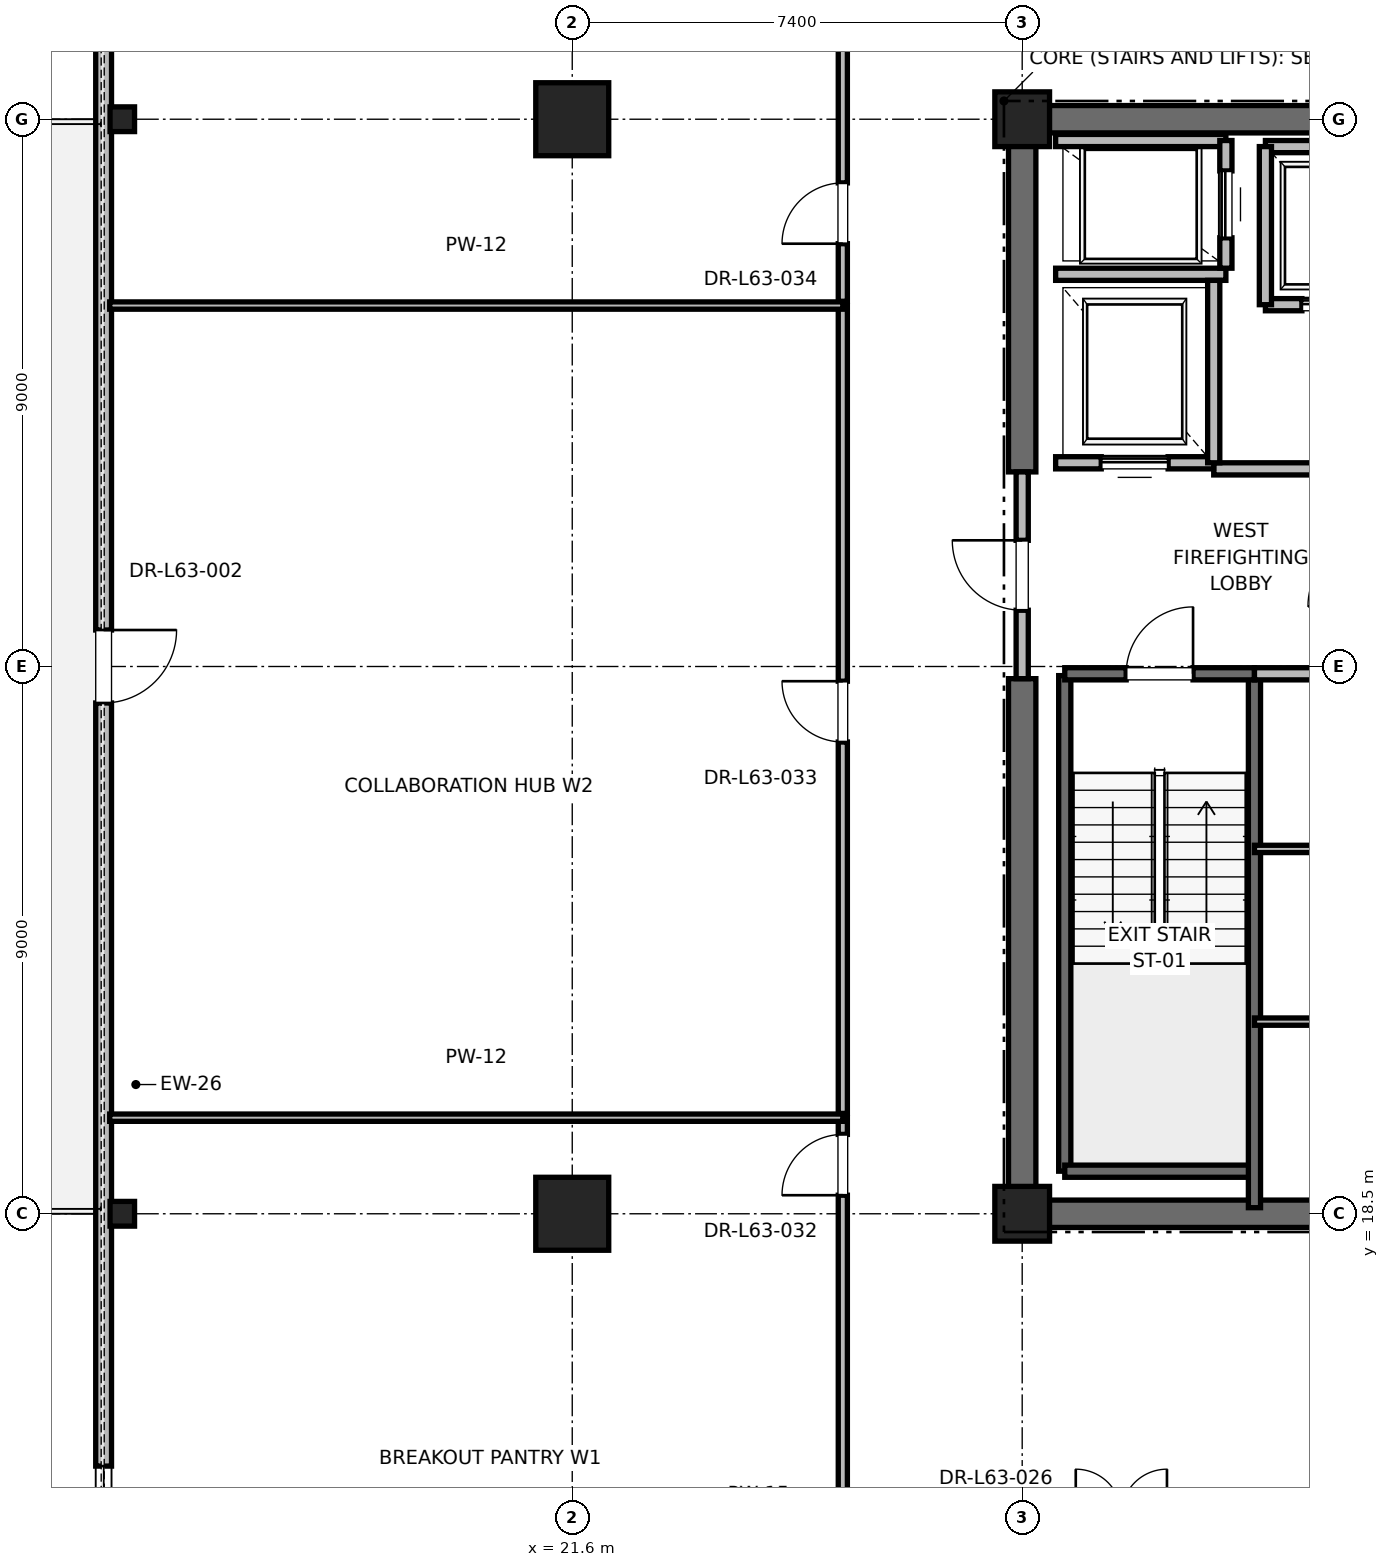
"""IFC4 building model, lengths in metres.
Left out: names, types, materials, properties, quantities, classifications, styles, units other than length and angle.
Written with IfcOpenShell. Run it as: python <this file> out.ifc"""

import sys

from ifc_helpers import new_model, si_unit, direction, frame, frame_2d, origin, origin_2d, place, context, subcontext, project, spatial, rectangle, i_section, extrude, element, fill, save


model = new_model("IFC4")
c1 = context("Model", 3, precision=1e-05, world=origin(), true_north=direction((0.0, 1.0)))
c2 = subcontext(c1, "Body", "Model", "MODEL_VIEW")
j1 = project(units=[si_unit("LENGTHUNIT", "METRE"), si_unit("PLANEANGLEUNIT", "RADIAN")], contexts=[c1])
p1 = place(None, origin())
s1 = spatial("IfcSite", under=j1, at=p1, CompositionType="ELEMENT")
p2 = place(p1, origin())
s2 = spatial("IfcBuilding", under=s1, at=p2, CompositionType="ELEMENT")
p3 = place(p2, frame((0.0, 0.0, 271.2)))
s3 = spatial("IfcBuildingStorey", under=s2, at=p3, CompositionType="ELEMENT", Elevation=271.2)
for number, where, z_axis, x_axis in (
    (1, (21.6, 18.5, 0.0), (0.0, 0.0, 1.0), (1.0, 0.0, 0.0)),
    (2, (21.6, 36.5, 0.0), (0.0, 0.0, 1.0), (1.0, 0.0, 0.0)),
):
    element("IfcColumn", number, at=place(p3, frame(where, z_axis=z_axis, x_axis=x_axis)), inside=s3, PredefinedType="COLUMN", context=c2, shape_type="SweptSolid", body=[
        extrude(rectangle(XDim=1.2, YDim=1.2, at=origin_2d()), origin(), (0.0, 0.0, 1.0), 4.0),
    ])
for number, where, z_axis, x_axis in (
    (3, (14.2, 18.5, 0.0), (0.0, 0.0, 1.0), (1.0, 0.0, 0.0)),
    (4, (14.2, 36.5, 0.0), (0.0, 0.0, 1.0), (1.0, 0.0, 0.0)),
):
    element("IfcColumn", number, at=place(p3, frame(where, z_axis=z_axis, x_axis=x_axis)), inside=s3, PredefinedType="COLUMN", context=c2, shape_type="SweptSolid", body=[
        extrude(i_section(OverallWidth=0.403, OverallDepth=0.406, WebThickness=0.027, FlangeThickness=0.043, FilletRadius=0.015, at=origin_2d()), origin(), (0.0, 0.0, 1.0), 4.0),
    ])
for number, where, z_axis, x_axis in (
    (5, (29.0, 18.5, 0.0), (0.0, 0.0, 1.0), (1.0, 0.0, 0.0)),
    (6, (29.0, 36.5, 0.0), (0.0, 0.0, 1.0), (1.0, 0.0, 0.0)),
):
    element("IfcColumn", number, at=place(p3, frame(where, z_axis=z_axis, x_axis=x_axis)), inside=s3, PredefinedType="PILASTER", context=c2, shape_type="SweptSolid", body=[
        extrude(rectangle(XDim=0.9, YDim=0.9, at=origin_2d()), origin(), (0.0, 0.0, 1.0), 4.0),
    ])
p4 = place(p3, frame((29.0, 18.5, 0.0), z_axis=(0.0, 0.0, 1.0), x_axis=(1.0, 0.0, 0.0)))
e7 = element("IfcWall", 7, at=p4, inside=s3, PredefinedType="SHEAR", context=c2, shape_type="SweptSolid", body=[
    extrude(rectangle(XDim=9.2, YDim=0.45, at=frame_2d((4.6, 0.0))), origin(), (0.0, 0.0, 1.0), 3.785),
])
p5 = place(p3, frame((29.0, 36.5, 0.0), z_axis=(0.0, 0.0, 1.0), x_axis=(1.0, 0.0, 0.0)))
e8 = element("IfcWall", 8, at=p5, inside=s3, PredefinedType="SHEAR", context=c2, shape_type="SweptSolid", body=[
    extrude(rectangle(XDim=5.8, YDim=0.45, at=frame_2d((2.9, 0.0))), origin(), (0.0, 0.0, 1.0), 3.785),
])
p6 = place(p3, frame((29.0, 18.5, 0.0), z_axis=(0.0, 0.0, 1.0), x_axis=(0.0, 1.0, 0.0)))
e9 = element("IfcWall", 9, at=p6, inside=s3, PredefinedType="SHEAR", context=c2, shape_type="SweptSolid", body=[
    extrude(rectangle(XDim=8.8, YDim=0.45, at=frame_2d((4.4, 0.0))), origin(), (0.0, 0.0, 1.0), 3.785),
])
p7 = place(p3, frame((29.0, 30.7, 0.0), z_axis=(0.0, 0.0, 1.0), x_axis=(0.0, 1.0, 0.0)))
e10 = element("IfcWall", 10, at=p7, inside=s3, PredefinedType="SHEAR", context=c2, shape_type="SweptSolid", body=[
    extrude(rectangle(XDim=5.8, YDim=0.45, at=frame_2d((2.9, 0.0))), origin(), (0.0, 0.0, 1.0), 3.785),
])
p8 = place(p3, frame((13.893, 46.45, 0.0), z_axis=(0.0, 0.0, 1.0), x_axis=(0.0, -1.0, 0.0)))
e11 = element("IfcWall", 11, at=p8, inside=s3, PredefinedType="PARAPET", context=c2, shape_type="SweptSolid", body=[
    extrude(rectangle(XDim=37.899, YDim=0.26, at=frame_2d((18.95, 0.0))), origin(), (0.0, 0.0, 1.0), 3.123),
])
p9 = place(p8, frame((4.2, 0.0, 0.85)))
e12 = element("IfcOpeningElement", 12, at=p9, cuts=e11, PredefinedType="OPENING", context=c2, shape_type="SweptSolid", body=[
    extrude(rectangle(XDim=1.6, YDim=2.1, at=frame_2d((0.8, 1.05))), frame((0.0, 0.13, 0.0), z_axis=(0.0, -1.0, 0.0), x_axis=(1.0, 0.0, 0.0)), (0.0, 0.0, 1.0), 0.26),
])
p10 = place(p8, frame((18.35, 0.0, 0.0)))
e13 = element("IfcOpeningElement", 13, at=p10, cuts=e11, PredefinedType="OPENING", context=c2, shape_type="SweptSolid", body=[
    extrude(rectangle(XDim=1.2, YDim=2.2, at=frame_2d((0.6, 1.1))), frame((0.0, 0.13, 0.0), z_axis=(0.0, -1.0, 0.0), x_axis=(1.0, 0.0, 0.0)), (0.0, 0.0, 1.0), 0.26),
])
p11 = place(p8, frame((32.099, 0.0, 0.85)))
e14 = element("IfcOpeningElement", 14, at=p11, cuts=e11, PredefinedType="OPENING", context=c2, shape_type="SweptSolid", body=[
    extrude(rectangle(XDim=1.6, YDim=2.1, at=frame_2d((0.8, 1.05))), frame((0.0, 0.13, 0.0), z_axis=(0.0, -1.0, 0.0), x_axis=(1.0, 0.0, 0.0)), (0.0, 0.0, 1.0), 0.26),
])
p12 = place(p3, frame((29.7, 19.2, 0.0), z_axis=(0.0, 0.0, 1.0), x_axis=(0.0, 1.0, 0.0)))
e15 = element("IfcWall", 15, at=p12, inside=s3, PredefinedType="SOLIDWALL", context=c2, shape_type="SweptSolid", body=[
    extrude(rectangle(XDim=8.15, YDim=0.2, at=frame_2d((4.075, 0.0))), origin(), (0.0, 0.0, 1.0), 3.785),
])
p13 = place(p3, frame((29.7, 19.2, 0.0), z_axis=(0.0, 0.0, 1.0), x_axis=(1.0, 0.0, 0.0)))
e16 = element("IfcWall", 16, at=p13, inside=s3, PredefinedType="SOLIDWALL", context=c2, shape_type="SweptSolid", body=[
    extrude(rectangle(XDim=3.12, YDim=0.2, at=frame_2d((1.56, 0.0))), origin(), (0.0, 0.0, 1.0), 3.785),
])
p14 = place(p3, frame((32.82, 18.6, 0.0), z_axis=(0.0, 0.0, 1.0), x_axis=(0.0, 1.0, 0.0)))
e17 = element("IfcWall", 17, at=p14, inside=s3, PredefinedType="SOLIDWALL", context=c2, shape_type="SweptSolid", body=[
    extrude(rectangle(XDim=8.78, YDim=0.2, at=frame_2d((4.39, 0.0))), origin(), (0.0, 0.0, 1.0), 3.785),
])
p15 = place(p3, frame((29.7, 27.38, 0.0), z_axis=(0.0, 0.0, 1.0), x_axis=(1.0, 0.0, 0.0)))
e18 = element("IfcWall", 18, at=p15, inside=s3, PredefinedType="SOLIDWALL", context=c2, shape_type="SweptSolid", body=[
    extrude(rectangle(XDim=3.12, YDim=0.2, at=frame_2d((1.56, 0.0))), origin(), (0.0, 0.0, 1.0), 3.785),
])
p16 = place(p15, frame((1.01, 0.0, 0.0)))
e19 = element("IfcOpeningElement", 19, at=p16, cuts=e18, PredefinedType="OPENING", context=c2, shape_type="SweptSolid", body=[
    extrude(rectangle(XDim=1.1, YDim=2.15, at=frame_2d((0.55, 1.075))), frame((0.0, 0.1, 0.0), z_axis=(0.0, -1.0, 0.0), x_axis=(1.0, 0.0, 0.0)), (0.0, 0.0, 1.0), 0.2),
])
p17 = place(p3, frame((29.0, 27.3, 0.0), z_axis=(0.0, 0.0, 1.0), x_axis=(0.0, 1.0, 0.0)))
e20 = element("IfcWall", 20, at=p17, inside=s3, PredefinedType="PARTITIONING", context=c2, shape_type="SweptSolid", body=[
    extrude(rectangle(XDim=3.4, YDim=0.2, at=frame_2d((1.7, 0.0))), origin(), (0.0, 0.0, 1.0), 2.865),
])
p18 = place(p17, frame((1.125, 0.0, 0.0)))
e21 = element("IfcOpeningElement", 21, at=p18, cuts=e20, PredefinedType="OPENING", context=c2, shape_type="SweptSolid", body=[
    extrude(rectangle(XDim=1.15, YDim=2.2, at=frame_2d((0.575, 1.1))), frame((0.0, 0.1, 0.0), z_axis=(0.0, -1.0, 0.0), x_axis=(1.0, 0.0, 0.0)), (0.0, 0.0, 1.0), 0.2),
])
p19 = place(p3, frame((32.82, 27.38, 0.0), z_axis=(0.0, 0.0, 1.0), x_axis=(1.0, 0.0, 0.0)))
e22 = element("IfcWall", 22, at=p19, inside=s3, PredefinedType="PARTITIONING", context=c2, shape_type="SweptSolid", body=[
    extrude(rectangle(XDim=5.62, YDim=0.2, at=frame_2d((2.81, 0.0))), origin(), (0.0, 0.0, 1.0), 3.785),
])
p20 = place(p3, frame((32.15, 30.75, 0.0), z_axis=(0.0, 0.0, 1.0), x_axis=(1.0, 0.0, 0.0)))
e23 = element("IfcWall", 23, at=p20, inside=s3, PredefinedType="PARTITIONING", context=c2, shape_type="SweptSolid", body=[
    extrude(rectangle(XDim=2.7, YDim=0.2, at=frame_2d((1.35, 0.0))), origin(), (0.0, 0.0, 1.0), 3.785),
])
p21 = place(p3, frame((29.55, 30.85, 0.0), z_axis=(0.0, 0.0, 1.0), x_axis=(1.0, 0.0, 0.0)))
e24 = element("IfcWall", 24, at=p21, inside=s3, PredefinedType="SOLIDWALL", context=c2, shape_type="SweptSolid", body=[
    extrude(rectangle(XDim=2.6, YDim=0.2, at=frame_2d((1.3, 0.0))), origin(), (0.0, 0.0, 1.0), 2.865),
])
p22 = place(p21, frame((0.75, 0.0, 0.0)))
e25 = element("IfcOpeningElement", 25, at=p22, cuts=e24, PredefinedType="OPENING", context=c2, shape_type="SweptSolid", body=[
    extrude(rectangle(XDim=1.1, YDim=2.2, at=frame_2d((0.55, 1.1))), frame((0.0, 0.1, 0.0), z_axis=(0.0, -1.0, 0.0), x_axis=(1.0, 0.0, 0.0)), (0.0, 0.0, 1.0), 0.2),
])
p23 = place(p3, frame((29.55, 33.95, 0.0), z_axis=(0.0, 0.0, 1.0), x_axis=(1.0, 0.0, 0.0)))
e26 = element("IfcWall", 26, at=p23, inside=s3, PredefinedType="SOLIDWALL", context=c2, shape_type="SweptSolid", body=[
    extrude(rectangle(XDim=2.8, YDim=0.2, at=frame_2d((1.4, 0.0))), origin(), (0.0, 0.0, 1.0), 3.785),
])
p24 = place(p3, frame((32.15, 30.85, 0.0), z_axis=(0.0, 0.0, 1.0), x_axis=(0.0, 1.0, 0.0)))
e27 = element("IfcWall", 27, at=p24, inside=s3, PredefinedType="SOLIDWALL", context=c2, shape_type="SweptSolid", body=[
    extrude(rectangle(XDim=3.0, YDim=0.2, at=frame_2d((1.5, 0.0))), origin(), (0.0, 0.0, 1.0), 3.785),
])
p25 = place(p3, frame((32.35, 36.15, 0.0), z_axis=(0.0, 0.0, 1.0), x_axis=(-1.0, 0.0, 0.0)))
e28 = element("IfcWall", 28, at=p25, inside=s3, PredefinedType="SOLIDWALL", context=c2, shape_type="SweptSolid", body=[
    extrude(rectangle(XDim=2.8, YDim=0.2, at=frame_2d((1.4, 0.0))), origin(), (0.0, 0.0, 1.0), 3.148),
])
p26 = place(p3, frame((32.35, 34.05, 0.0), z_axis=(0.0, 0.0, 1.0), x_axis=(0.0, 1.0, 0.0)))
e29 = element("IfcWall", 29, at=p26, inside=s3, PredefinedType="SOLIDWALL", context=c2, shape_type="SweptSolid", body=[
    extrude(rectangle(XDim=2.1, YDim=0.2, at=frame_2d((1.05, 0.0))), origin(), (0.0, 0.0, 1.0), 3.785),
])
p27 = place(p26, frame((0.5, 0.0, 0.0)))
e30 = element("IfcOpeningElement", 30, at=p27, cuts=e29, PredefinedType="OPENING", context=c2, shape_type="SweptSolid", body=[
    extrude(rectangle(XDim=1.1, YDim=2.2, at=frame_2d((0.55, 1.1))), frame((0.0, 0.1, 0.0), z_axis=(0.0, -1.0, 0.0), x_axis=(1.0, 0.0, 0.0)), (0.0, 0.0, 1.0), 0.2),
])
p28 = place(p3, frame((33.0, 33.45, 0.0), z_axis=(0.0, 0.0, 1.0), x_axis=(1.0, 0.0, 0.0)))
e31 = element("IfcWall", 31, at=p28, inside=s3, PredefinedType="SOLIDWALL", context=c2, shape_type="SweptSolid", body=[
    extrude(rectangle(XDim=2.3, YDim=0.2, at=frame_2d((1.15, 0.0))), origin(), (0.0, 0.0, 1.0), 3.785),
])
p29 = place(p28, frame((0.6, 0.0, 0.0)))
e32 = element("IfcOpeningElement", 32, at=p29, cuts=e31, PredefinedType="OPENING", context=c2, shape_type="SweptSolid", body=[
    extrude(rectangle(XDim=1.1, YDim=2.2, at=frame_2d((0.55, 1.1))), frame((0.0, 0.1, 0.0), z_axis=(0.0, -1.0, 0.0), x_axis=(1.0, 0.0, 0.0)), (0.0, 0.0, 1.0), 0.2),
])
p30 = place(p3, frame((35.3, 36.05, 0.0), z_axis=(0.0, 0.0, 1.0), x_axis=(-1.0, 0.0, 0.0)))
e33 = element("IfcWall", 33, at=p30, inside=s3, PredefinedType="SOLIDWALL", context=c2, shape_type="SweptSolid", body=[
    extrude(rectangle(XDim=2.3, YDim=0.2, at=frame_2d((1.15, 0.0))), origin(), (0.0, 0.0, 1.0), 2.865),
])
p31 = place(p3, frame((33.0, 36.05, 0.0), z_axis=(0.0, 0.0, 1.0), x_axis=(0.0, -1.0, 0.0)))
e34 = element("IfcWall", 34, at=p31, inside=s3, PredefinedType="SOLIDWALL", context=c2, shape_type="SweptSolid", body=[
    extrude(rectangle(XDim=2.6, YDim=0.2, at=frame_2d((1.3, 0.0))), origin(), (0.0, 0.0, 1.0), 3.785),
])
for number, where, z_axis, x_axis in (
    (35, (32.82, 21.66, 0.0), (0.0, 0.0, 1.0), (1.0, 0.0, 0.0)),
    (36, (32.82, 24.5, 0.0), (0.0, 0.0, 1.0), (1.0, 0.0, 0.0)),
):
    element("IfcWall", number, at=place(p3, frame(where, z_axis=z_axis, x_axis=x_axis)), inside=s3, PredefinedType="PARTITIONING", context=c2, shape_type="SweptSolid", body=[
        extrude(rectangle(XDim=5.23, YDim=0.12, at=frame_2d((2.615, 0.0))), origin(), (0.0, 0.0, 1.0), 2.85),
    ])
p32 = place(p3, frame((26.05, 8.95, 0.0), z_axis=(0.0, 0.0, 1.0), x_axis=(0.0, 1.0, 0.0)))
e37 = element("IfcWall", 37, at=p32, inside=s3, PredefinedType="PARTITIONING", context=c2, shape_type="SweptSolid", body=[
    extrude(rectangle(XDim=11.13, YDim=0.15, at=frame_2d((5.565, 0.0))), origin(), (0.0, 0.0, 1.0), 2.85),
])
p33 = place(p32, frame((9.855, 0.0, 0.0)))
e38 = element("IfcOpeningElement", 38, at=p33, cuts=e37, PredefinedType="OPENING", context=c2, shape_type="SweptSolid", body=[
    extrude(rectangle(XDim=1.0, YDim=2.15, at=frame_2d((0.5, 1.075))), frame((0.0, 0.075, 0.0), z_axis=(0.0, -1.0, 0.0), x_axis=(1.0, 0.0, 0.0)), (0.0, 0.0, 1.0), 0.15),
])
p34 = place(p3, frame((13.993, 20.08, 0.0), z_axis=(0.0, 0.0, 1.0), x_axis=(1.0, 0.0, 0.0)))
e39 = element("IfcWall", 39, at=p34, inside=s3, PredefinedType="PARTITIONING", context=c2, shape_type="SweptSolid", body=[
    extrude(rectangle(XDim=12.057, YDim=0.12, at=frame_2d((6.029, 0.0))), origin(), (0.0, 0.0, 1.0), 2.85),
])
p35 = place(p3, frame((26.05, 20.15, 0.0), z_axis=(0.0, 0.0, 1.0), x_axis=(0.0, 1.0, 0.0)))
e40 = element("IfcWall", 40, at=p35, inside=s3, PredefinedType="PARTITIONING", context=c2, shape_type="SweptSolid", body=[
    extrude(rectangle(XDim=13.286, YDim=0.15, at=frame_2d((6.643, 0.0))), origin(), (0.0, 0.0, 1.0), 2.85),
])
p36 = place(p35, frame((6.108, 0.0, 0.0)))
e41 = element("IfcOpeningElement", 41, at=p36, cuts=e40, PredefinedType="OPENING", context=c2, shape_type="SweptSolid", body=[
    extrude(rectangle(XDim=1.0, YDim=2.15, at=frame_2d((0.5, 1.075))), frame((0.0, 0.075, 0.0), z_axis=(0.0, -1.0, 0.0), x_axis=(1.0, 0.0, 0.0)), (0.0, 0.0, 1.0), 0.15),
])
p37 = place(p3, frame((13.993, 33.436, 0.0), z_axis=(0.0, 0.0, 1.0), x_axis=(1.0, 0.0, 0.0)))
e42 = element("IfcWall", 42, at=p37, inside=s3, PredefinedType="PARTITIONING", context=c2, shape_type="SweptSolid", body=[
    extrude(rectangle(XDim=12.057, YDim=0.12, at=frame_2d((6.029, 0.0))), origin(), (0.0, 0.0, 1.0), 2.85),
])
p38 = place(p3, frame((26.05, 33.506, 0.0), z_axis=(0.0, 0.0, 1.0), x_axis=(0.0, 1.0, 0.0)))
e43 = element("IfcWall", 43, at=p38, inside=s3, PredefinedType="PARTITIONING", context=c2, shape_type="SweptSolid", body=[
    extrude(rectangle(XDim=12.544, YDim=0.15, at=frame_2d((6.272, 0.0))), origin(), (0.0, 0.0, 1.0), 2.85),
])
p39 = place(p38, frame((0.947, 0.0, 0.0)))
e44 = element("IfcOpeningElement", 44, at=p39, cuts=e43, PredefinedType="OPENING", context=c2, shape_type="SweptSolid", body=[
    extrude(rectangle(XDim=1.0, YDim=2.15, at=frame_2d((0.5, 1.075))), frame((0.0, 0.075, 0.0), z_axis=(0.0, -1.0, 0.0), x_axis=(1.0, 0.0, 0.0)), (0.0, 0.0, 1.0), 0.15),
])
p40 = place(p10, origin())
e45 = element("IfcDoor", 45, at=p40, inside=s3, OperationType="SINGLE_SWING_LEFT", PredefinedType="DOOR", context=c2, shape_type="SweptSolid", body=[
    extrude(rectangle(XDim=1.2, YDim=2.2, at=frame_2d((0.6, 1.1))), frame((0.0, 0.025, 0.0), z_axis=(0.0, -1.0, 0.0), x_axis=(1.0, 0.0, 0.0)), (0.0, 0.0, 1.0), 0.05),
])
fill(e13, e45)
p41 = place(p11, origin())
e46 = element("IfcWindow", 46, at=p41, inside=s3, PartitioningType="SINGLE_PANEL", PredefinedType="WINDOW", context=c2, shape_type="SweptSolid", body=[
    extrude(rectangle(XDim=1.6, YDim=2.1, at=frame_2d((0.8, 1.05))), frame((0.0, 0.03, 0.0), z_axis=(0.0, -1.0, 0.0), x_axis=(1.0, 0.0, 0.0)), (0.0, 0.0, 1.0), 0.06),
])
fill(e14, e46)
p42 = place(p16, origin())
e47 = element("IfcDoor", 47, at=p42, inside=s3, OperationType="SINGLE_SWING_RIGHT", PredefinedType="DOOR", context=c2, shape_type="SweptSolid", body=[
    extrude(rectangle(XDim=1.1, YDim=2.15, at=frame_2d((0.55, 1.075))), frame((0.0, 0.025, 0.0), z_axis=(0.0, -1.0, 0.0), x_axis=(1.0, 0.0, 0.0)), (0.0, 0.0, 1.0), 0.05),
])
fill(e19, e47)
p43 = place(p18, origin())
e48 = element("IfcDoor", 48, at=p43, inside=s3, OperationType="SINGLE_SWING_RIGHT", PredefinedType="DOOR", context=c2, shape_type="SweptSolid", body=[
    extrude(rectangle(XDim=1.15, YDim=2.2, at=frame_2d((0.575, 1.1))), frame((0.0, 0.025, 0.0), z_axis=(0.0, -1.0, 0.0), x_axis=(1.0, 0.0, 0.0)), (0.0, 0.0, 1.0), 0.05),
])
fill(e21, e48)
p44 = place(p22, origin())
e49 = element("IfcDoor", 49, at=p44, inside=s3, OperationType="SLIDING_TO_RIGHT", PredefinedType="DOOR", context=c2, shape_type="SweptSolid", body=[
    extrude(rectangle(XDim=1.1, YDim=2.2, at=frame_2d((0.55, 1.1))), frame((0.0, 0.025, 0.0), z_axis=(0.0, -1.0, 0.0), x_axis=(1.0, 0.0, 0.0)), (0.0, 0.0, 1.0), 0.05),
])
fill(e25, e49)
p45 = place(p27, origin())
e50 = element("IfcDoor", 50, at=p45, inside=s3, OperationType="SLIDING_TO_RIGHT", PredefinedType="DOOR", context=c2, shape_type="SweptSolid", body=[
    extrude(rectangle(XDim=1.1, YDim=2.2, at=frame_2d((0.55, 1.1))), frame((0.0, 0.025, 0.0), z_axis=(0.0, -1.0, 0.0), x_axis=(1.0, 0.0, 0.0)), (0.0, 0.0, 1.0), 0.05),
])
fill(e30, e50)
p46 = place(p29, origin())
e51 = element("IfcDoor", 51, at=p46, inside=s3, OperationType="SLIDING_TO_RIGHT", PredefinedType="DOOR", context=c2, shape_type="SweptSolid", body=[
    extrude(rectangle(XDim=1.1, YDim=2.2, at=frame_2d((0.55, 1.1))), frame((0.0, 0.025, 0.0), z_axis=(0.0, -1.0, 0.0), x_axis=(1.0, 0.0, 0.0)), (0.0, 0.0, 1.0), 0.05),
])
fill(e32, e51)
p47 = place(p33, origin())
e52 = element("IfcDoor", 52, at=p47, inside=s3, OperationType="SINGLE_SWING_LEFT", PredefinedType="DOOR", context=c2, shape_type="SweptSolid", body=[
    extrude(rectangle(XDim=1.0, YDim=2.15, at=frame_2d((0.5, 1.075))), frame((0.0, 0.025, 0.0), z_axis=(0.0, -1.0, 0.0), x_axis=(1.0, 0.0, 0.0)), (0.0, 0.0, 1.0), 0.05),
])
fill(e38, e52)
p48 = place(p36, origin())
e53 = element("IfcDoor", 53, at=p48, inside=s3, OperationType="SINGLE_SWING_RIGHT", PredefinedType="DOOR", context=c2, shape_type="SweptSolid", body=[
    extrude(rectangle(XDim=1.0, YDim=2.15, at=frame_2d((0.5, 1.075))), frame((0.0, 0.025, 0.0), z_axis=(0.0, -1.0, 0.0), x_axis=(1.0, 0.0, 0.0)), (0.0, 0.0, 1.0), 0.05),
])
fill(e41, e53)
p49 = place(p39, origin())
e54 = element("IfcDoor", 54, at=p49, inside=s3, OperationType="SINGLE_SWING_LEFT", PredefinedType="DOOR", context=c2, shape_type="SweptSolid", body=[
    extrude(rectangle(XDim=1.0, YDim=2.15, at=frame_2d((0.5, 1.075))), frame((0.0, 0.025, 0.0), z_axis=(0.0, -1.0, 0.0), x_axis=(1.0, 0.0, 0.0)), (0.0, 0.0, 1.0), 0.05),
])
fill(e44, e54)
save(model, sys.argv[1])
